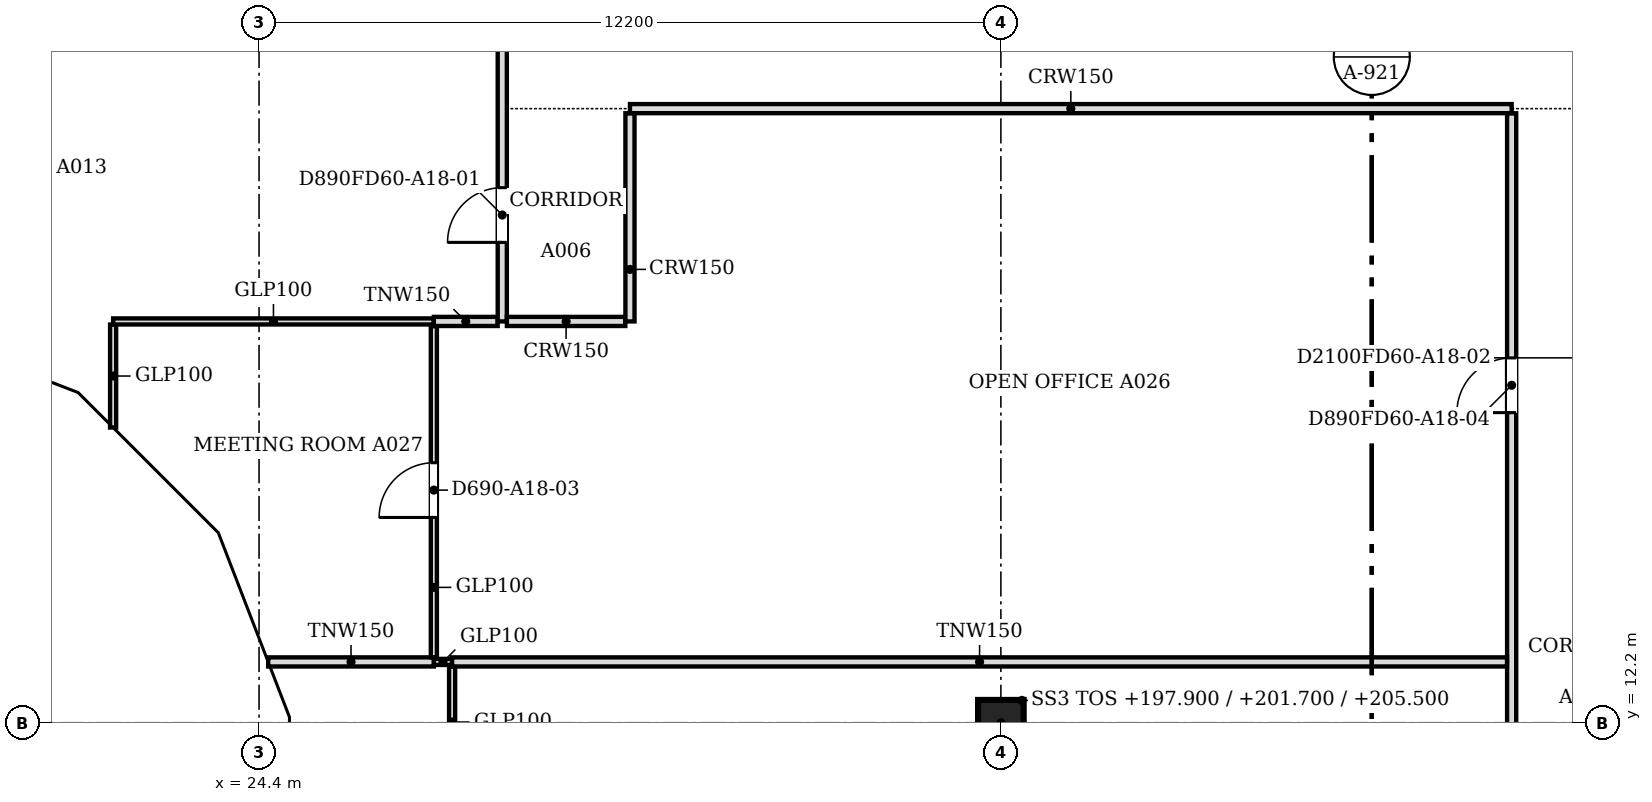
"""IFC4 building model, lengths in metres.
Left out: names, types, materials, properties, quantities, classifications, styles, units other than length and angle.
Written with IfcOpenShell. Run it as: python <this file> out.ifc"""

import sys

from ifc_helpers import new_model, si_unit, direction, frame, frame_2d, origin, origin_2d, place, context, subcontext, project, spatial, polyline, rectangle, outline, extrude, faceted_brep, source, transform, mapped, element, fill, save


model = new_model("IFC4")
c1 = context("Model", 3, precision=1e-05, world=origin(), true_north=direction((0.0, 1.0)))
c2 = subcontext(c1, "Body", "Model", "MODEL_VIEW")
j1 = project(units=[si_unit("LENGTHUNIT", "METRE"), si_unit("PLANEANGLEUNIT", "RADIAN")], contexts=[c1])
p1 = place(None, origin())
s1 = spatial("IfcSite", under=j1, at=p1, CompositionType="ELEMENT")
p2 = place(p1, origin())
s2 = spatial("IfcBuilding", under=s1, at=p2, CompositionType="ELEMENT")
p3 = place(p2, frame((0.0, 0.0, 197.9)))
s3 = spatial("IfcBuildingStorey", under=s2, at=p3, CompositionType="ELEMENT", Elevation=197.9)
p4 = place(p3, frame((36.6, 12.2, 0.0), z_axis=(0.0, 0.0, 1.0), x_axis=(1.0, 0.0, 0.0)))
e1 = element("IfcColumn", 1, at=p4, inside=s3, PredefinedType="COLUMN", context=c2, shape_type="SweptSolid", body=[
    extrude(rectangle(XDim=0.75, YDim=0.75, at=origin_2d()), origin(), (0.0, 0.0, 1.0), 3.6),
])
m1 = source(origin(), c2, "Body", "Brep", [
    faceted_brep([(3.143, -0.25, 0.064), (0.093, -0.25, 3.744), (0.093, -0.25, 0.0), (3.143, -0.25, 0.0), (0.0, 0.25, 3.743), (0.047, 0.25, 3.8), (3.196, 0.25, 0.0), (0.0, 0.25, 0.0), (0.047, 0.0, 3.8), (3.196, -0.0, 0.0)], [[[0, 1, 2, 3]], [[4, 5, 6, 7]], [[6, 5, 8, 1, 0, 9]], [[5, 4, 8]], [[7, 6, 9, 3, 2]], [[7, 2, 1, 8, 4]], [[3, 9, 0]]]),
])
p5 = place(p3, frame((18.303, 18.567, 0.0), z_axis=(0.0, 0.0, 1.0), x_axis=(0.932978940178, -0.359930961693, 0.0)))
e2 = element("IfcWall", 2, at=p5, inside=s3, PredefinedType="SOLIDWALL", context=c2, shape_type="MappedRepresentation", body=[
    mapped(m1, transform((0.0, 0.0, 0.0), scale=1.0)),
])
m2 = source(origin(), c2, "Body", "SweptSolid", [
    extrude(outline(polyline([(2.664, 0.25), (0.247, 3.167), (0.247, 0.25), (2.664, 0.25)])), frame((0.0, 0.26, 0.0), z_axis=(0.0, -1.0, 0.0), x_axis=(1.0, 0.0, 0.0)), (0.0, 0.0, 1.0), 0.52),
])
p6 = place(p5, origin())
e3 = element("IfcOpeningElement", 3, at=p6, cuts=e2, PredefinedType="OPENING", context=c2, shape_type="MappedRepresentation", body=[
    mapped(m2, transform((0.0, 0.0, 0.0), scale=1.0)),
])
m3 = source(origin(), c2, "Body", "Brep", [
    faceted_brep([(3.103, -0.25, 3.736), (0.053, -0.25, 0.064), (0.053, -0.25, 0.0), (3.103, -0.25, 0.0), (0.0, 0.25, 0.0), (3.156, 0.25, 3.8), (3.209, 0.25, 3.736), (3.209, 0.25, 0.0), (3.156, -0.0, 3.8), (0.0, 0.0, 0.0)], [[[0, 1, 2, 3]], [[4, 5, 6, 7]], [[6, 5, 8]], [[5, 4, 9, 1, 0, 8]], [[4, 7, 3, 2, 9]], [[9, 2, 1]], [[3, 7, 6, 8, 0]]]),
])
p7 = place(p3, frame((21.285, 17.417, 0.0), z_axis=(0.0, 0.0, 1.0), x_axis=(0.707106781187, -0.707106781187, 0.0)))
e4 = element("IfcWall", 4, at=p7, inside=s3, PredefinedType="SOLIDWALL", context=c2, shape_type="MappedRepresentation", body=[
    mapped(m3, transform((0.0, 0.0, 0.0), scale=1.0)),
])
m4 = source(origin(), c2, "Body", "SweptSolid", [
    extrude(outline(polyline([(2.956, 3.168), (0.533, 0.25), (2.956, 0.25), (2.956, 3.168)])), frame((0.0, 0.26, 0.0), z_axis=(0.0, -1.0, 0.0), x_axis=(1.0, 0.0, 0.0)), (0.0, 0.0, 1.0), 0.52),
])
p8 = place(p7, origin())
e5 = element("IfcOpeningElement", 5, at=p8, cuts=e4, PredefinedType="OPENING", context=c2, shape_type="MappedRepresentation", body=[
    mapped(m4, transform((0.0, 0.0, 0.0), scale=1.0)),
])
m5 = source(origin(), c2, "Body", "Brep", [
    faceted_brep([(3.156, -0.25, 0.056), (0.106, -0.25, 3.736), (0.106, -0.25, 0.0), (3.156, -0.25, 0.0), (0.0, 0.25, 3.736), (0.053, 0.25, 3.8), (3.202, 0.25, 0.0), (0.0, 0.25, 0.0), (0.053, 0.0, 3.8), (3.202, -0.0, 0.0)], [[[0, 1, 2, 3]], [[4, 5, 6, 7]], [[6, 5, 8, 1, 0, 9]], [[5, 4, 8]], [[7, 6, 9, 3, 2]], [[7, 2, 1, 8, 4]], [[3, 9, 0]]]),
])
p9 = place(p3, frame((23.497, 15.234, 0.0), z_axis=(0.0, 0.0, 1.0), x_axis=(0.359913782069, -0.932985567668, 0.0)))
e6 = element("IfcWall", 6, at=p9, inside=s3, PredefinedType="SOLIDWALL", context=c2, shape_type="MappedRepresentation", body=[
    mapped(m5, transform((0.0, 0.0, 0.0), scale=1.0)),
])
m6 = source(origin(), c2, "Body", "SweptSolid", [
    extrude(outline(polyline([(2.671, 0.25), (0.253, 3.167), (0.253, 0.25), (2.671, 0.25)])), frame((0.0, 0.26, 0.0), z_axis=(0.0, -1.0, 0.0), x_axis=(1.0, 0.0, 0.0)), (0.0, 0.0, 1.0), 0.52),
])
p10 = place(p9, origin())
e7 = element("IfcOpeningElement", 7, at=p10, cuts=e6, PredefinedType="OPENING", context=c2, shape_type="MappedRepresentation", body=[
    mapped(m6, transform((0.0, 0.0, 0.0), scale=1.0)),
])
m7 = source(origin(), c2, "Body", "Brep", [
    faceted_brep([(6.1, -0.25, 0.0), (3.096, -0.25, 3.8), (0.047, -0.25, 0.057), (0.047, -0.25, 0.0), (0.0, 0.25, 0.0), (3.096, 0.25, 3.8), (6.053, 0.25, 0.059), (6.053, 0.25, 0.0), (6.1, -0.0, 0.0), (0.0, 0.0, 0.0)], [[[0, 1, 2, 3]], [[4, 5, 6, 7]], [[6, 5, 1, 0, 8]], [[5, 4, 9, 2, 1]], [[4, 7, 8, 0, 3, 9]], [[9, 3, 2]], [[8, 7, 6]]]),
])
p11 = place(p3, frame((24.65, 12.247, 0.0), z_axis=(0.0, 0.0, 1.0), x_axis=(0.0, -1.0, 0.0)))
e8 = element("IfcWall", 8, at=p11, inside=s3, PredefinedType="SOLIDWALL", context=c2, shape_type="MappedRepresentation", body=[
    mapped(m7, transform((0.0, 0.0, 0.0), scale=1.0)),
])
m8 = source(origin(), c2, "Body", "SweptSolid", [
    extrude(outline(polyline([(5.584, 0.25), (3.094, 3.401), (0.526, 0.25), (5.584, 0.25)])), frame((0.0, 0.26, 0.0), z_axis=(0.0, -1.0, 0.0), x_axis=(1.0, 0.0, 0.0)), (0.0, 0.0, 1.0), 0.52),
])
p12 = place(p11, origin())
e9 = element("IfcOpeningElement", 9, at=p12, cuts=e8, PredefinedType="OPENING", context=c2, shape_type="MappedRepresentation", body=[
    mapped(m8, transform((0.0, 0.0, 0.0), scale=1.0)),
])
p13 = place(p2, frame((0.0, 0.0, 201.7)))
s4 = spatial("IfcBuildingStorey", under=s2, at=p13, CompositionType="ELEMENT", Elevation=201.7)
m9 = source(origin(), c2, "Body", "Brep", [
    faceted_brep([(3.096, -0.25, 7.536), (0.047, -0.25, 3.856), (0.047, -0.25, 3.744), (3.096, -0.25, 0.064), (0.0, 0.25, 3.8), (3.149, 0.25, 7.6), (3.202, 0.25, 7.536), (3.202, 0.25, 0.064), (3.149, 0.25, 0.0), (3.149, -0.0, 0.0), (3.149, -0.0, 7.6), (0.0, 0.0, 3.8)], [[[0, 1, 2, 3]], [[4, 5, 6, 7, 8]], [[8, 7, 9]], [[6, 5, 10]], [[5, 4, 11, 1, 0, 10]], [[4, 8, 9, 3, 2, 11]], [[11, 2, 1]], [[3, 9, 7, 6, 10, 0]]]),
])
p14 = place(p13, frame((18.346, 18.55, -3.8), z_axis=(0.0, 0.0, 1.0), x_axis=(0.932985567668, -0.359913782069, 0.0)))
e10 = element("IfcWall", 10, at=p14, inside=s4, PredefinedType="SOLIDWALL", context=c2, shape_type="MappedRepresentation", body=[
    mapped(m9, transform((0.0, 0.0, 0.0), scale=1.0)),
])
m10 = source(origin(), c2, "Body", "SweptSolid", [
    extrude(outline(polyline([(2.949, 6.967), (0.325, 3.8), (2.949, 0.633), (2.949, 6.967)])), frame((0.0, 0.26, 0.0), z_axis=(0.0, -1.0, 0.0), x_axis=(1.0, 0.0, 0.0)), (0.0, 0.0, 1.0), 0.52),
])
p15 = place(p14, origin())
e11 = element("IfcOpeningElement", 11, at=p15, cuts=e10, PredefinedType="OPENING", context=c2, shape_type="MappedRepresentation", body=[
    mapped(m10, transform((0.0, 0.0, 0.0), scale=1.0)),
])
m11 = source(origin(), c2, "Body", "Brep", [
    faceted_brep([(0.106, -0.25, 0.064), (3.156, -0.25, 3.736), (3.156, -0.25, 3.864), (0.106, -0.25, 7.536), (0.0, 0.25, 7.536), (0.053, 0.25, 7.6), (3.209, 0.25, 3.8), (0.053, 0.25, 0.0), (0.0, 0.25, 0.064), (3.209, -0.0, 3.8), (0.053, 0.0, 0.0), (0.053, 0.0, 7.6)], [[[0, 1, 2, 3]], [[4, 5, 6, 7, 8]], [[7, 6, 9, 1, 0, 10]], [[6, 5, 11, 3, 2, 9]], [[5, 4, 11]], [[8, 7, 10]], [[8, 10, 0, 3, 11, 4]], [[1, 9, 2]]]),
])
p16 = place(p13, frame((21.248, 17.454, -3.8), z_axis=(0.0, 0.0, 1.0), x_axis=(0.707106781187, -0.707106781187, 0.0)))
e12 = element("IfcWall", 12, at=p16, inside=s4, PredefinedType="SOLIDWALL", context=c2, shape_type="MappedRepresentation", body=[
    mapped(m11, transform((0.0, 0.0, 0.0), scale=1.0)),
])
m12 = source(origin(), c2, "Body", "SweptSolid", [
    extrude(outline(polyline([(0.253, 0.632), (2.884, 3.8), (0.253, 6.968), (0.253, 0.632)])), frame((0.0, 0.26, 0.0), z_axis=(0.0, -1.0, 0.0), x_axis=(1.0, 0.0, 0.0)), (0.0, 0.0, 1.0), 0.52),
])
p17 = place(p16, origin())
e13 = element("IfcOpeningElement", 13, at=p17, cuts=e12, PredefinedType="OPENING", context=c2, shape_type="MappedRepresentation", body=[
    mapped(m12, transform((0.0, 0.0, 0.0), scale=1.0)),
])
m13 = source(origin(), c2, "Body", "Brep", [
    faceted_brep([(3.103, -0.25, 7.544), (0.053, -0.25, 3.864), (0.053, -0.25, 3.736), (3.103, -0.25, 0.056), (0.0, 0.25, 3.8), (3.149, 0.25, 7.6), (3.196, 0.25, 7.543), (3.196, 0.25, 0.057), (3.149, 0.25, 0.0), (3.149, -0.0, 0.0), (3.149, -0.0, 7.6), (0.0, 0.0, 3.8)], [[[0, 1, 2, 3]], [[4, 5, 6, 7, 8]], [[8, 7, 9]], [[6, 5, 10]], [[5, 4, 11, 1, 0, 10]], [[4, 8, 9, 3, 2, 11]], [[11, 2, 1]], [[3, 9, 7, 6, 10, 0]]]),
])
p18 = place(p13, frame((23.517, 15.185, -3.8), z_axis=(0.0, 0.0, 1.0), x_axis=(0.359864468756, -0.933004589553, 0.0)))
e14 = element("IfcWall", 14, at=p18, inside=s4, PredefinedType="SOLIDWALL", context=c2, shape_type="MappedRepresentation", body=[
    mapped(m13, transform((0.0, 0.0, 0.0), scale=1.0)),
])
p19 = place(p18, origin())
e15 = element("IfcOpeningElement", 15, at=p19, cuts=e14, PredefinedType="OPENING", context=c2, shape_type="MappedRepresentation", body=[
    mapped(m10, transform((0.0, 0.0, 0.0), scale=1.0)),
])
m14 = source(origin(), c2, "Body", "Brep", [
    faceted_brep([(0.093, -0.25, 0.057), (3.143, -0.25, 3.8), (0.093, -0.25, 7.543), (0.0, 0.25, 7.544), (0.047, 0.25, 7.6), (3.143, 0.25, 3.8), (0.047, 0.25, 0.0), (0.0, 0.25, 0.056), (0.047, 0.0, 0.0), (0.047, 0.0, 7.6)], [[[0, 1, 2]], [[3, 4, 5, 6, 7]], [[6, 5, 1, 0, 8]], [[5, 4, 9, 2, 1]], [[4, 3, 9]], [[7, 6, 8]], [[7, 8, 0, 2, 9, 3]]]),
])
p20 = place(p13, frame((24.65, 12.293, -3.8), z_axis=(0.0, 0.0, 1.0), x_axis=(0.0, -1.0, 0.0)))
e16 = element("IfcWall", 16, at=p20, inside=s4, PredefinedType="SOLIDWALL", context=c2, shape_type="MappedRepresentation", body=[
    mapped(m14, transform((0.0, 0.0, 0.0), scale=1.0)),
])
m15 = source(origin(), c2, "Body", "SweptSolid", [
    extrude(outline(polyline([(0.247, 0.641), (2.821, 3.8), (0.247, 6.959), (0.247, 0.641)])), frame((0.0, 0.26, 0.0), z_axis=(0.0, -1.0, 0.0), x_axis=(1.0, 0.0, 0.0)), (0.0, 0.0, 1.0), 0.52),
])
p21 = place(p20, origin())
e17 = element("IfcOpeningElement", 17, at=p21, cuts=e16, PredefinedType="OPENING", context=c2, shape_type="MappedRepresentation", body=[
    mapped(m15, transform((0.0, 0.0, 0.0), scale=1.0)),
])
p22 = place(p3, frame((45.0, 0.5, 0.0), z_axis=(0.0, 0.0, 1.0), x_axis=(0.0, 1.0, 0.0)))
e18 = element("IfcWall", 18, at=p22, inside=s3, PredefinedType="PARTITIONING", context=c2, shape_type="SweptSolid", body=[
    extrude(rectangle(XDim=21.724, YDim=0.15, at=frame_2d((10.862, 0.0))), origin(), (0.0, 0.0, 1.0), 3.067),
])
m16 = source(origin(), c2, "Body", "SweptSolid", [
    extrude(rectangle(XDim=0.9, YDim=2.1, at=frame_2d((0.45, 1.05))), frame((0.0, 0.085, 0.0), z_axis=(0.0, -1.0, 0.0), x_axis=(1.0, 0.0, 0.0)), (0.0, 0.0, 1.0), 0.17),
])
p23 = place(p22, frame((7.7, 0.0, 0.0)))
e19 = element("IfcOpeningElement", 19, at=p23, cuts=e18, PredefinedType="OPENING", context=c2, shape_type="MappedRepresentation", body=[
    mapped(m16, transform((0.0, 0.0, 0.0), scale=1.0)),
])
p24 = place(p22, frame((16.8, 0.0, 0.0)))
e20 = element("IfcOpeningElement", 20, at=p24, cuts=e18, PredefinedType="OPENING", context=c2, shape_type="MappedRepresentation", body=[
    mapped(m16, transform((0.0, 0.0, 0.0), scale=1.0)),
])
p25 = place(p3, frame((27.575, 8.599, 0.0), z_axis=(0.0, 0.0, 1.0), x_axis=(0.0, 1.0, 0.0)))
e21 = element("IfcWall", 21, at=p25, inside=s3, PredefinedType="PARTITIONING", context=c2, shape_type="SweptSolid", body=[
    extrude(rectangle(XDim=4.525, YDim=0.1, at=frame_2d((2.263, 0.0))), origin(), (0.0, 0.0, 1.0), 3.067),
])
m17 = source(origin(), c2, "Body", "SweptSolid", [
    extrude(rectangle(XDim=0.9, YDim=2.1, at=frame_2d((0.45, 1.05))), frame((0.0, 0.06, 0.0), z_axis=(0.0, -1.0, 0.0), x_axis=(1.0, 0.0, 0.0)), (0.0, 0.0, 1.0), 0.12),
])
p26 = place(p25, frame((1.8, 0.0, 0.0)))
e22 = element("IfcOpeningElement", 22, at=p26, cuts=e21, PredefinedType="OPENING", context=c2, shape_type="MappedRepresentation", body=[
    mapped(m17, transform((0.0, 0.0, 0.0), scale=1.0)),
])
p27 = place(p3, frame((24.55, 13.2, 0.0), z_axis=(0.0, 0.0, 1.0), x_axis=(1.0, 0.0, 0.0)))
e23 = element("IfcWall", 23, at=p27, inside=s3, PredefinedType="PARTITIONING", context=c2, shape_type="SweptSolid", body=[
    extrude(rectangle(XDim=2.725, YDim=0.15, at=frame_2d((1.362, 0.0))), origin(), (0.0, 0.0, 1.0), 3.067),
])
p28 = place(p3, frame((27.276, 13.2, 0.0), z_axis=(0.0, 0.0, 1.0), x_axis=(1.0, 0.0, 0.0)))
e24 = element("IfcWall", 24, at=p28, inside=s3, PredefinedType="PARTITIONING", context=c2, shape_type="SweptSolid", body=[
    extrude(rectangle(XDim=0.298, YDim=0.1, at=frame_2d((0.149, 0.0))), origin(), (0.0, 0.0, 1.0), 3.067),
])
p29 = place(p3, frame((27.575, 13.2, 0.0), z_axis=(0.0, 0.0, 1.0), x_axis=(1.0, 0.0, 0.0)))
e25 = element("IfcWall", 25, at=p29, inside=s3, PredefinedType="PARTITIONING", context=c2, shape_type="SweptSolid", body=[
    extrude(rectangle(XDim=17.349, YDim=0.15, at=frame_2d((8.675, 0.0))), origin(), (0.0, 0.0, 1.0), 3.067),
])
p30 = place(p3, frame((27.275, 13.276, 0.0), z_axis=(0.0, 0.0, 1.0), x_axis=(0.0, 1.0, 0.0)))
e26 = element("IfcWall", 26, at=p30, inside=s3, PredefinedType="PARTITIONING", context=c2, shape_type="SweptSolid", body=[
    extrude(rectangle(XDim=5.448, YDim=0.1, at=frame_2d((2.724, 0.0))), origin(), (0.0, 0.0, 1.0), 3.067),
])
p31 = place(p30, frame((2.3, 0.0, 0.0)))
e27 = element("IfcOpeningElement", 27, at=p31, cuts=e26, PredefinedType="OPENING", context=c2, shape_type="MappedRepresentation", body=[
    mapped(m17, transform((0.0, 0.0, 0.0), scale=1.0)),
])
p32 = place(p3, frame((22.0, 17.055, 0.0), z_axis=(0.0, 0.0, 1.0), x_axis=(0.0, 1.0, 0.0)))
e28 = element("IfcWall", 28, at=p32, inside=s3, PredefinedType="PARTITIONING", context=c2, shape_type="SweptSolid", body=[
    extrude(rectangle(XDim=1.694, YDim=0.1, at=frame_2d((0.847, 0.0))), origin(), (0.0, 0.0, 1.0), 3.067),
])
p33 = place(p3, frame((22.0, 18.8, 0.0), z_axis=(0.0, 0.0, 1.0), x_axis=(1.0, 0.0, 0.0)))
e29 = element("IfcWall", 29, at=p33, inside=s3, PredefinedType="PARTITIONING", context=c2, shape_type="SweptSolid", body=[
    extrude(rectangle(XDim=5.274, YDim=0.1, at=frame_2d((2.637, 0.0))), origin(), (0.0, 0.0, 1.0), 3.067),
])
p34 = place(p3, frame((27.275, 18.8, 0.0), z_axis=(0.0, 0.0, 1.0), x_axis=(1.0, 0.0, 0.0)))
e30 = element("IfcWall", 30, at=p34, inside=s3, PredefinedType="PARTITIONING", context=c2, shape_type="SweptSolid", body=[
    extrude(rectangle(XDim=1.049, YDim=0.15, at=frame_2d((0.524, 0.0))), origin(), (0.0, 0.0, 1.0), 3.067),
])
p35 = place(p3, frame((28.4, 18.8, 0.0), z_axis=(0.0, 0.0, 1.0), x_axis=(0.0, 1.0, 0.0)))
e31 = element("IfcWall", 31, at=p35, inside=s3, PredefinedType="PARTITIONING", context=c2, shape_type="SweptSolid", body=[
    extrude(rectangle(XDim=26.9, YDim=0.15, at=frame_2d((13.45, 0.0))), origin(), (0.0, 0.0, 1.0), 3.067),
])
p36 = place(p35, frame((1.3, 0.0, 0.0)))
e32 = element("IfcOpeningElement", 32, at=p36, cuts=e31, PredefinedType="OPENING", context=c2, shape_type="MappedRepresentation", body=[
    mapped(m16, transform((0.0, 0.0, 0.0), scale=1.0)),
])
m18 = source(origin(), c2, "Body", "SweptSolid", [
    extrude(rectangle(XDim=1.0, YDim=2.1, at=frame_2d((0.5, 1.05))), frame((0.0, 0.085, 0.0), z_axis=(0.0, -1.0, 0.0), x_axis=(1.0, 0.0, 0.0)), (0.0, 0.0, 1.0), 0.17),
])
p37 = place(p35, frame((9.7, 0.0, 0.0)))
e33 = element("IfcOpeningElement", 33, at=p37, cuts=e31, PredefinedType="OPENING", context=c2, shape_type="MappedRepresentation", body=[
    mapped(m18, transform((0.0, 0.0, 0.0), scale=1.0)),
])
p38 = place(p35, frame((20.35, 0.0, 0.0)))
e34 = element("IfcOpeningElement", 34, at=p38, cuts=e31, PredefinedType="OPENING", context=c2, shape_type="MappedRepresentation", body=[
    mapped(m18, transform((0.0, 0.0, 0.0), scale=1.0)),
])
p39 = place(p3, frame((28.476, 18.8, 0.0), z_axis=(0.0, 0.0, 1.0), x_axis=(1.0, 0.0, 0.0)))
e35 = element("IfcWall", 35, at=p39, inside=s3, PredefinedType="PARTITIONING", context=c2, shape_type="SweptSolid", body=[
    extrude(rectangle(XDim=1.948, YDim=0.15, at=frame_2d((0.974, 0.0))), origin(), (0.0, 0.0, 1.0), 3.067),
])
p40 = place(p3, frame((30.5, 18.8, 0.0), z_axis=(0.0, 0.0, 1.0), x_axis=(0.0, 1.0, 0.0)))
e36 = element("IfcWall", 36, at=p40, inside=s3, PredefinedType="PARTITIONING", context=c2, shape_type="SweptSolid", body=[
    extrude(rectangle(XDim=3.424, YDim=0.15, at=frame_2d((1.712, 0.0))), origin(), (0.0, 0.0, 1.0), 3.067),
])
p41 = place(p3, frame((30.5, 22.3, 0.0), z_axis=(0.0, 0.0, 1.0), x_axis=(1.0, 0.0, 0.0)))
e37 = element("IfcWall", 37, at=p41, inside=s3, PredefinedType="PARTITIONING", context=c2, shape_type="SweptSolid", body=[
    extrude(rectangle(XDim=14.5, YDim=0.15, at=frame_2d((7.25, 0.0))), origin(), (0.0, 0.0, 1.0), 3.067),
])
m19 = source(origin(), c2, "Body", "SweptSolid", [
    extrude(rectangle(XDim=0.9, YDim=2.1, at=frame_2d((0.45, 1.05))), frame((0.0, 0.025, 0.0), z_axis=(0.0, -1.0, 0.0), x_axis=(1.0, 0.0, 0.0)), (0.0, 0.0, 1.0), 0.05),
])
p42 = place(p36, origin())
e38 = element("IfcDoor", 38, at=p42, inside=s3, OperationType="SINGLE_SWING_LEFT", PredefinedType="DOOR", context=c2, shape_type="MappedRepresentation", body=[
    mapped(m19, transform((0.0, 0.0, 0.0), scale=1.0)),
])
fill(e32, e38)
p43 = place(p31, origin())
e39 = element("IfcDoor", 39, at=p43, inside=s3, OperationType="SINGLE_SWING_LEFT", PredefinedType="DOOR", context=c2, shape_type="MappedRepresentation", body=[
    mapped(m19, transform((0.0, 0.0, 0.0), scale=1.0)),
])
fill(e27, e39)
p44 = place(p24, origin())
e40 = element("IfcDoor", 40, at=p44, inside=s3, OperationType="SINGLE_SWING_LEFT", PredefinedType="DOOR", context=c2, shape_type="MappedRepresentation", body=[
    mapped(m19, transform((0.0, 0.0, 0.0), scale=1.0)),
])
fill(e20, e40)
save(model, sys.argv[1])
